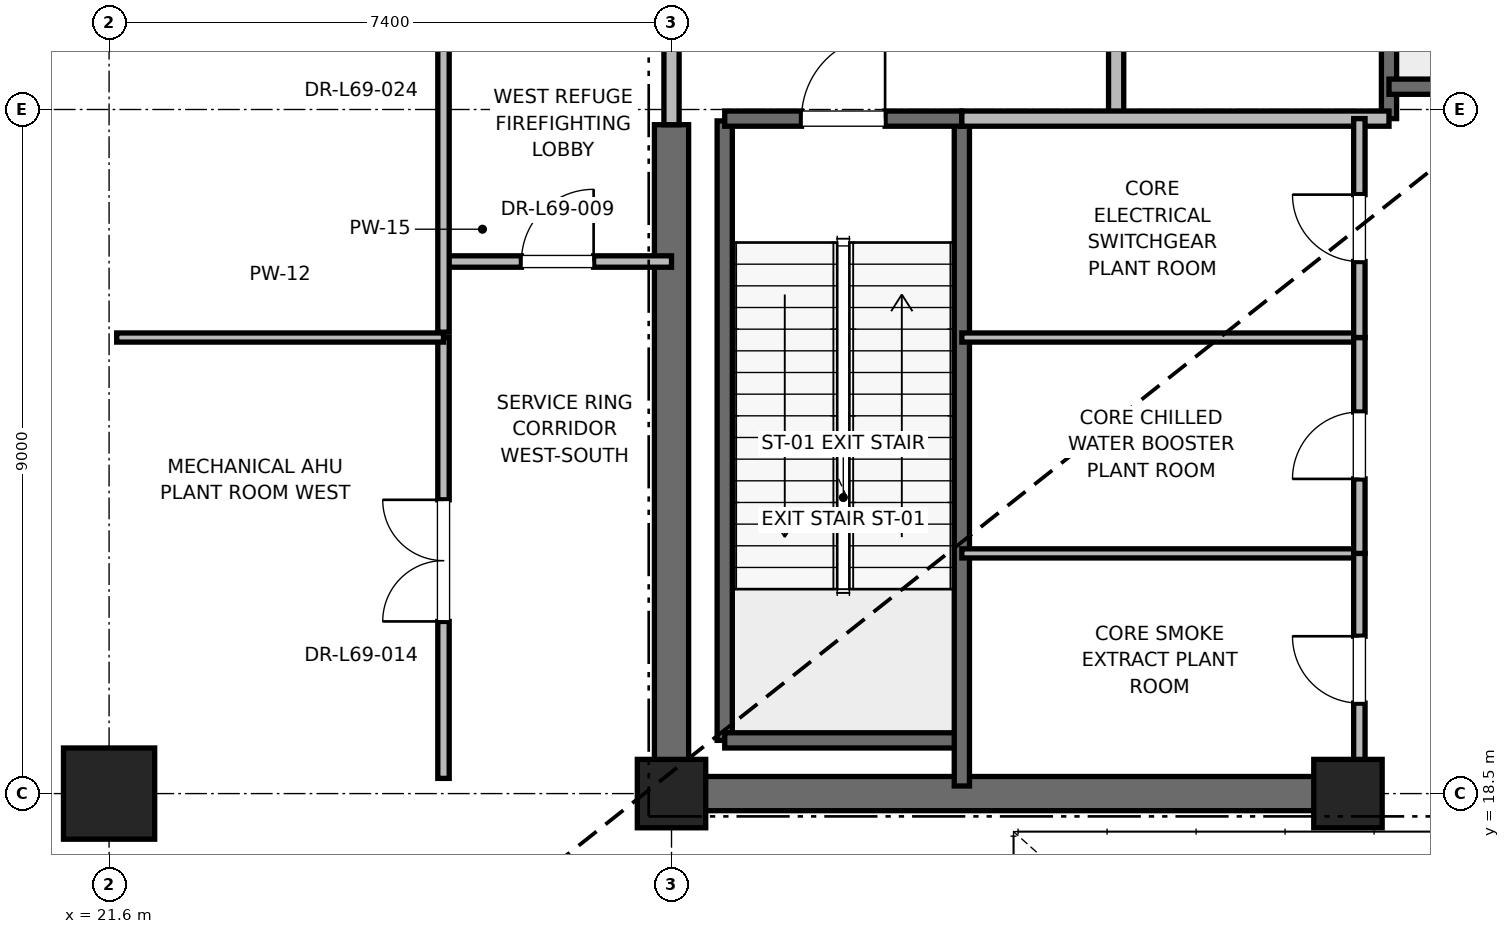
"""IFC4 building model, lengths in metres.
Left out: names, types, materials, properties, quantities, classifications, styles, units other than length and angle.
Written with IfcOpenShell. Run it as: python <this file> out.ifc"""

import sys

from ifc_helpers import new_model, si_unit, direction, frame, frame_2d, origin, origin_2d, place, context, subcontext, project, spatial, rectangle, extrude, element, fill, save


model = new_model("IFC4")
c1 = context("Model", 3, precision=1e-05, world=origin(), true_north=direction((0.0, 1.0)))
c2 = subcontext(c1, "Body", "Model", "MODEL_VIEW")
j1 = project(units=[si_unit("LENGTHUNIT", "METRE"), si_unit("PLANEANGLEUNIT", "RADIAN")], contexts=[c1])
p1 = place(None, origin())
s1 = spatial("IfcSite", under=j1, at=p1, CompositionType="ELEMENT")
p2 = place(p1, origin())
s2 = spatial("IfcBuilding", under=s1, at=p2, CompositionType="ELEMENT")
p3 = place(p2, frame((0.0, 0.0, 295.2)))
s3 = spatial("IfcBuildingStorey", under=s2, at=p3, CompositionType="ELEMENT", Elevation=295.2)
p4 = place(p3, frame((21.6, 18.5, 0.0), z_axis=(0.0, 0.0, 1.0), x_axis=(1.0, 0.0, 0.0)))
e1 = element("IfcColumn", 1, at=p4, inside=s3, PredefinedType="COLUMN", context=c2, shape_type="SweptSolid", body=[
    extrude(rectangle(XDim=1.2, YDim=1.2, at=origin_2d()), origin(), (0.0, 0.0, 1.0), 5.8),
])
for number, where, z_axis, x_axis in (
    (2, (29.0, 18.5, 0.0), (0.0, 0.0, 1.0), (1.0, 0.0, 0.0)),
    (3, (37.9, 18.5, 0.0), (0.0, 0.0, 1.0), (1.0, 0.0, 0.0)),
):
    element("IfcColumn", number, at=place(p3, frame(where, z_axis=z_axis, x_axis=x_axis)), inside=s3, PredefinedType="PILASTER", context=c2, shape_type="SweptSolid", body=[
        extrude(rectangle(XDim=0.9, YDim=0.9, at=origin_2d()), origin(), (0.0, 0.0, 1.0), 5.8),
    ])
p5 = place(p3, frame((29.0, 18.5, 0.0), z_axis=(0.0, 0.0, 1.0), x_axis=(1.0, 0.0, 0.0)))
e4 = element("IfcWall", 4, at=p5, inside=s3, PredefinedType="SHEAR", context=c2, shape_type="SweptSolid", body=[
    extrude(rectangle(XDim=9.2, YDim=0.45, at=frame_2d((4.6, 0.0))), origin(), (0.0, 0.0, 1.0), 5.5),
])
p6 = place(p3, frame((29.0, 18.5, 0.0), z_axis=(0.0, 0.0, 1.0), x_axis=(0.0, 1.0, 0.0)))
e5 = element("IfcWall", 5, at=p6, inside=s3, PredefinedType="SHEAR", context=c2, shape_type="SweptSolid", body=[
    extrude(rectangle(XDim=8.8, YDim=0.45, at=frame_2d((4.4, 0.0))), origin(), (0.0, 0.0, 1.0), 5.5),
])
p7 = place(p3, frame((29.7, 19.2, 0.0), z_axis=(0.0, 0.0, 1.0), x_axis=(0.0, 1.0, 0.0)))
e6 = element("IfcWall", 6, at=p7, inside=s3, PredefinedType="SOLIDWALL", context=c2, shape_type="SweptSolid", body=[
    extrude(rectangle(XDim=8.15, YDim=0.2, at=frame_2d((4.075, 0.0))), origin(), (0.0, 0.0, 1.0), 5.5),
])
p8 = place(p3, frame((29.7, 19.2, 0.0), z_axis=(0.0, 0.0, 1.0), x_axis=(1.0, 0.0, 0.0)))
e7 = element("IfcWall", 7, at=p8, inside=s3, PredefinedType="SOLIDWALL", context=c2, shape_type="SweptSolid", body=[
    extrude(rectangle(XDim=3.12, YDim=0.2, at=frame_2d((1.56, 0.0))), origin(), (0.0, 0.0, 1.0), 5.5),
])
p9 = place(p3, frame((32.82, 18.6, 0.0), z_axis=(0.0, 0.0, 1.0), x_axis=(0.0, 1.0, 0.0)))
e8 = element("IfcWall", 8, at=p9, inside=s3, PredefinedType="SOLIDWALL", context=c2, shape_type="SweptSolid", body=[
    extrude(rectangle(XDim=8.78, YDim=0.2, at=frame_2d((4.39, 0.0))), origin(), (0.0, 0.0, 1.0), 5.5),
])
p10 = place(p3, frame((29.7, 27.38, 0.0), z_axis=(0.0, 0.0, 1.0), x_axis=(1.0, 0.0, 0.0)))
e9 = element("IfcWall", 9, at=p10, inside=s3, PredefinedType="SOLIDWALL", context=c2, shape_type="SweptSolid", body=[
    extrude(rectangle(XDim=3.12, YDim=0.2, at=frame_2d((1.56, 0.0))), origin(), (0.0, 0.0, 1.0), 5.5),
])
p11 = place(p10, frame((1.01, 0.0, 0.0)))
e10 = element("IfcOpeningElement", 10, at=p11, cuts=e9, PredefinedType="OPENING", context=c2, shape_type="SweptSolid", body=[
    extrude(rectangle(XDim=1.1, YDim=2.15, at=frame_2d((0.55, 1.075))), frame((0.0, 0.1, 0.0), z_axis=(0.0, -1.0, 0.0), x_axis=(1.0, 0.0, 0.0)), (0.0, 0.0, 1.0), 0.2),
])
p12 = place(p3, frame((38.44, 27.38, 0.0), z_axis=(0.0, 0.0, 1.0), x_axis=(0.0, 1.0, 0.0)))
e11 = element("IfcWall", 11, at=p12, inside=s3, PredefinedType="SOLIDWALL", context=c2, shape_type="SweptSolid", body=[
    extrude(rectangle(XDim=8.87, YDim=0.2, at=frame_2d((4.435, 0.0))), origin(), (0.0, 0.0, 1.0), 5.5),
])
p13 = place(p3, frame((38.44, 27.8, 0.0), z_axis=(0.0, 0.0, 1.0), x_axis=(1.0, 0.0, 0.0)))
e12 = element("IfcWall", 12, at=p13, inside=s3, PredefinedType="SOLIDWALL", context=c2, shape_type="SweptSolid", body=[
    extrude(rectangle(XDim=3.32, YDim=0.2, at=frame_2d((1.66, 0.0))), origin(), (0.0, 0.0, 1.0), 5.5),
])
p14 = place(p3, frame((34.85, 27.38, 0.0), z_axis=(0.0, 0.0, 1.0), x_axis=(0.0, 1.0, 0.0)))
e13 = element("IfcWall", 13, at=p14, inside=s3, PredefinedType="PARTITIONING", context=c2, shape_type="SweptSolid", body=[
    extrude(rectangle(XDim=3.37, YDim=0.2, at=frame_2d((1.685, 0.0))), origin(), (0.0, 0.0, 1.0), 5.5),
])
p15 = place(p14, frame((1.11, 0.0, 0.0)))
e14 = element("IfcOpeningElement", 14, at=p15, cuts=e13, PredefinedType="OPENING", context=c2, shape_type="SweptSolid", body=[
    extrude(rectangle(XDim=1.15, YDim=2.2, at=frame_2d((0.575, 1.1))), frame((0.0, 0.1, 0.0), z_axis=(0.0, -1.0, 0.0), x_axis=(1.0, 0.0, 0.0)), (0.0, 0.0, 1.0), 0.2),
])
p16 = place(p3, frame((29.0, 27.3, 0.0), z_axis=(0.0, 0.0, 1.0), x_axis=(0.0, 1.0, 0.0)))
e15 = element("IfcWall", 15, at=p16, inside=s3, PredefinedType="PARTITIONING", context=c2, shape_type="SweptSolid", body=[
    extrude(rectangle(XDim=3.4, YDim=0.2, at=frame_2d((1.7, 0.0))), origin(), (0.0, 0.0, 1.0), 4.58),
])
p17 = place(p16, frame((1.125, 0.0, 0.0)))
e16 = element("IfcOpeningElement", 16, at=p17, cuts=e15, PredefinedType="OPENING", context=c2, shape_type="SweptSolid", body=[
    extrude(rectangle(XDim=1.15, YDim=2.2, at=frame_2d((0.575, 1.1))), frame((0.0, 0.1, 0.0), z_axis=(0.0, -1.0, 0.0), x_axis=(1.0, 0.0, 0.0)), (0.0, 0.0, 1.0), 0.2),
])
p18 = place(p3, frame((32.82, 27.38, 0.0), z_axis=(0.0, 0.0, 1.0), x_axis=(1.0, 0.0, 0.0)))
e17 = element("IfcWall", 17, at=p18, inside=s3, PredefinedType="PARTITIONING", context=c2, shape_type="SweptSolid", body=[
    extrude(rectangle(XDim=5.62, YDim=0.2, at=frame_2d((2.81, 0.0))), origin(), (0.0, 0.0, 1.0), 5.5),
])
for number, where, z_axis, x_axis in (
    (18, (32.82, 21.66, 0.0), (0.0, 0.0, 1.0), (1.0, 0.0, 0.0)),
    (19, (32.82, 24.5, 0.0), (0.0, 0.0, 1.0), (1.0, 0.0, 0.0)),
):
    element("IfcWall", number, at=place(p3, frame(where, z_axis=z_axis, x_axis=x_axis)), inside=s3, PredefinedType="PARTITIONING", context=c2, shape_type="SweptSolid", body=[
        extrude(rectangle(XDim=5.23, YDim=0.12, at=frame_2d((2.615, 0.0))), origin(), (0.0, 0.0, 1.0), 2.85),
    ])
p19 = place(p3, frame((38.05, 18.6, 0.0), z_axis=(0.0, 0.0, 1.0), x_axis=(0.0, 1.0, 0.0)))
e20 = element("IfcWall", 20, at=p19, inside=s3, PredefinedType="PARTITIONING", context=c2, shape_type="SweptSolid", body=[
    extrude(rectangle(XDim=3.06, YDim=0.15, at=frame_2d((1.53, 0.0))), origin(), (0.0, 0.0, 1.0), 2.85),
])
p20 = place(p19, frame((1.09, 0.0, 0.0)))
e21 = element("IfcOpeningElement", 21, at=p20, cuts=e20, PredefinedType="OPENING", context=c2, shape_type="SweptSolid", body=[
    extrude(rectangle(XDim=0.88, YDim=2.1, at=frame_2d((0.44, 1.05))), frame((0.0, 0.075, 0.0), z_axis=(0.0, -1.0, 0.0), x_axis=(1.0, 0.0, 0.0)), (0.0, 0.0, 1.0), 0.15),
])
p21 = place(p3, frame((38.05, 21.66, 0.0), z_axis=(0.0, 0.0, 1.0), x_axis=(0.0, 1.0, 0.0)))
e22 = element("IfcWall", 22, at=p21, inside=s3, PredefinedType="PARTITIONING", context=c2, shape_type="SweptSolid", body=[
    extrude(rectangle(XDim=2.84, YDim=0.15, at=frame_2d((1.42, 0.0))), origin(), (0.0, 0.0, 1.0), 2.85),
])
p22 = place(p21, frame((0.98, 0.0, 0.0)))
e23 = element("IfcOpeningElement", 23, at=p22, cuts=e22, PredefinedType="OPENING", context=c2, shape_type="SweptSolid", body=[
    extrude(rectangle(XDim=0.88, YDim=2.1, at=frame_2d((0.44, 1.05))), frame((0.0, 0.075, 0.0), z_axis=(0.0, -1.0, 0.0), x_axis=(1.0, 0.0, 0.0)), (0.0, 0.0, 1.0), 0.15),
])
p23 = place(p3, frame((38.05, 24.5, 0.0), z_axis=(0.0, 0.0, 1.0), x_axis=(0.0, 1.0, 0.0)))
e24 = element("IfcWall", 24, at=p23, inside=s3, PredefinedType="PARTITIONING", context=c2, shape_type="SweptSolid", body=[
    extrude(rectangle(XDim=2.88, YDim=0.15, at=frame_2d((1.44, 0.0))), origin(), (0.0, 0.0, 1.0), 2.85),
])
p24 = place(p23, frame((1.0, 0.0, 0.0)))
e25 = element("IfcOpeningElement", 25, at=p24, cuts=e24, PredefinedType="OPENING", context=c2, shape_type="SweptSolid", body=[
    extrude(rectangle(XDim=0.88, YDim=2.1, at=frame_2d((0.44, 1.05))), frame((0.0, 0.075, 0.0), z_axis=(0.0, -1.0, 0.0), x_axis=(1.0, 0.0, 0.0)), (0.0, 0.0, 1.0), 0.15),
])
p25 = place(p3, frame((26.0, 25.5, 0.0), z_axis=(0.0, 0.0, 1.0), x_axis=(1.0, 0.0, 0.0)))
e26 = element("IfcWall", 26, at=p25, inside=s3, PredefinedType="PARTITIONING", context=c2, shape_type="SweptSolid", body=[
    extrude(rectangle(XDim=3.0, YDim=0.15, at=frame_2d((1.5, 0.0))), origin(), (0.0, 0.0, 1.0), 2.85),
])
p26 = place(p25, frame((1.025, 0.0, 0.0)))
e27 = element("IfcOpeningElement", 27, at=p26, cuts=e26, PredefinedType="OPENING", context=c2, shape_type="SweptSolid", body=[
    extrude(rectangle(XDim=0.95, YDim=2.15, at=frame_2d((0.475, 1.075))), frame((0.0, 0.075, 0.0), z_axis=(0.0, -1.0, 0.0), x_axis=(1.0, 0.0, 0.0)), (0.0, 0.0, 1.0), 0.15),
])
p27 = place(p3, frame((26.0, 18.7, 0.0), z_axis=(0.0, 0.0, 1.0), x_axis=(0.0, 1.0, 0.0)))
e28 = element("IfcWall", 28, at=p27, inside=s3, PredefinedType="PARTITIONING", context=c2, shape_type="SweptSolid", body=[
    extrude(rectangle(XDim=5.8, YDim=0.15, at=frame_2d((2.9, 0.0))), origin(), (0.0, 0.0, 1.0), 2.85),
])
p28 = place(p27, frame((2.065, 0.0, 0.0)))
e29 = element("IfcOpeningElement", 29, at=p28, cuts=e28, PredefinedType="OPENING", context=c2, shape_type="SweptSolid", body=[
    extrude(rectangle(XDim=1.6, YDim=2.25, at=frame_2d((0.8, 1.125))), frame((0.0, 0.075, 0.0), z_axis=(0.0, -1.0, 0.0), x_axis=(1.0, 0.0, 0.0)), (0.0, 0.0, 1.0), 0.15),
])
p29 = place(p3, frame((21.7, 24.5, 0.0), z_axis=(0.0, 0.0, 1.0), x_axis=(1.0, 0.0, 0.0)))
e30 = element("IfcWall", 30, at=p29, inside=s3, PredefinedType="PARTITIONING", context=c2, shape_type="SweptSolid", body=[
    extrude(rectangle(XDim=4.3, YDim=0.12, at=frame_2d((2.15, 0.0))), origin(), (0.0, 0.0, 1.0), 2.85),
])
p30 = place(p3, frame((26.0, 24.57, 0.0), z_axis=(0.0, 0.0, 1.0), x_axis=(0.0, 1.0, 0.0)))
e31 = element("IfcWall", 31, at=p30, inside=s3, PredefinedType="PARTITIONING", context=c2, shape_type="SweptSolid", body=[
    extrude(rectangle(XDim=11.73, YDim=0.15, at=frame_2d((5.865, 0.0))), origin(), (0.0, 0.0, 1.0), 2.85),
])
p31 = place(p30, frame((3.955, 0.0, 0.0)))
e32 = element("IfcOpeningElement", 32, at=p31, cuts=e31, PredefinedType="OPENING", context=c2, shape_type="SweptSolid", body=[
    extrude(rectangle(XDim=0.95, YDim=2.15, at=frame_2d((0.475, 1.075))), frame((0.0, 0.075, 0.0), z_axis=(0.0, -1.0, 0.0), x_axis=(1.0, 0.0, 0.0)), (0.0, 0.0, 1.0), 0.15),
])
p32 = place(p11, origin())
e33 = element("IfcDoor", 33, at=p32, inside=s3, OperationType="SINGLE_SWING_RIGHT", PredefinedType="DOOR", context=c2, shape_type="SweptSolid", body=[
    extrude(rectangle(XDim=1.1, YDim=2.15, at=frame_2d((0.55, 1.075))), frame((0.0, 0.025, 0.0), z_axis=(0.0, -1.0, 0.0), x_axis=(1.0, 0.0, 0.0)), (0.0, 0.0, 1.0), 0.05),
])
fill(e10, e33)
p33 = place(p20, origin())
e34 = element("IfcDoor", 34, at=p33, inside=s3, OperationType="SINGLE_SWING_RIGHT", PredefinedType="DOOR", context=c2, shape_type="SweptSolid", body=[
    extrude(rectangle(XDim=0.88, YDim=2.1, at=frame_2d((0.44, 1.05))), frame((0.0, 0.025, 0.0), z_axis=(0.0, -1.0, 0.0), x_axis=(1.0, 0.0, 0.0)), (0.0, 0.0, 1.0), 0.05),
])
fill(e21, e34)
p34 = place(p22, origin())
e35 = element("IfcDoor", 35, at=p34, inside=s3, OperationType="SINGLE_SWING_LEFT", PredefinedType="DOOR", context=c2, shape_type="SweptSolid", body=[
    extrude(rectangle(XDim=0.88, YDim=2.1, at=frame_2d((0.44, 1.05))), frame((0.0, 0.025, 0.0), z_axis=(0.0, -1.0, 0.0), x_axis=(1.0, 0.0, 0.0)), (0.0, 0.0, 1.0), 0.05),
])
fill(e23, e35)
p35 = place(p24, origin())
e36 = element("IfcDoor", 36, at=p35, inside=s3, OperationType="SINGLE_SWING_RIGHT", PredefinedType="DOOR", context=c2, shape_type="SweptSolid", body=[
    extrude(rectangle(XDim=0.88, YDim=2.1, at=frame_2d((0.44, 1.05))), frame((0.0, 0.025, 0.0), z_axis=(0.0, -1.0, 0.0), x_axis=(1.0, 0.0, 0.0)), (0.0, 0.0, 1.0), 0.05),
])
fill(e25, e36)
p36 = place(p26, origin())
e37 = element("IfcDoor", 37, at=p36, inside=s3, OperationType="SINGLE_SWING_RIGHT", PredefinedType="DOOR", context=c2, shape_type="SweptSolid", body=[
    extrude(rectangle(XDim=0.95, YDim=2.15, at=frame_2d((0.475, 1.075))), frame((0.0, 0.025, 0.0), z_axis=(0.0, -1.0, 0.0), x_axis=(1.0, 0.0, 0.0)), (0.0, 0.0, 1.0), 0.05),
])
fill(e27, e37)
p37 = place(p28, origin())
e38 = element("IfcDoor", 38, at=p37, inside=s3, OperationType="DOUBLE_DOOR_SINGLE_SWING", PredefinedType="DOOR", context=c2, shape_type="SweptSolid", body=[
    extrude(rectangle(XDim=1.6, YDim=2.25, at=frame_2d((0.8, 1.125))), frame((0.0, 0.025, 0.0), z_axis=(0.0, -1.0, 0.0), x_axis=(1.0, 0.0, 0.0)), (0.0, 0.0, 1.0), 0.05),
])
fill(e29, e38)
save(model, sys.argv[1])
